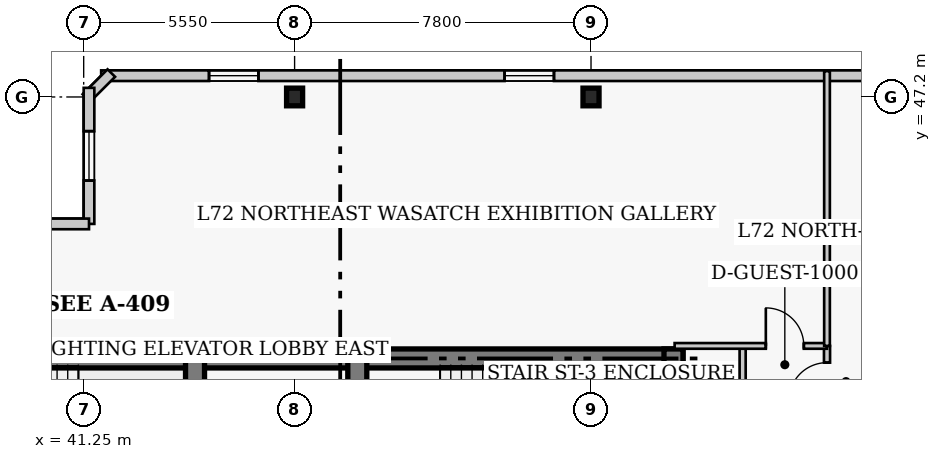
"""IFC4 building model, lengths in metres.
Left out: names, types, materials, properties, quantities, classifications, styles, units other than length and angle.
Written with IfcOpenShell. Run it as: python <this file> out.ifc"""

import sys

from ifc_helpers import new_model, si_unit, direction, frame, frame_2d, origin, origin_2d, place, context, subcontext, project, spatial, rectangle, i_section, extrude, element, fill, save


model = new_model("IFC4")
c1 = context("Model", 3, precision=1e-05, world=origin(), true_north=direction((0.0, 1.0)))
c2 = subcontext(c1, "Body", "Model", "MODEL_VIEW")
j1 = project(units=[si_unit("LENGTHUNIT", "METRE"), si_unit("PLANEANGLEUNIT", "RADIAN")], contexts=[c1])
p1 = place(None, origin())
s1 = spatial("IfcSite", under=j1, at=p1, CompositionType="ELEMENT")
p2 = place(p1, origin())
s2 = spatial("IfcBuilding", under=s1, at=p2, CompositionType="ELEMENT")
p3 = place(p2, frame((0.0, 0.0, 289.4)))
s3 = spatial("IfcBuildingStorey", under=s2, at=p3, CompositionType="ELEMENT", Elevation=289.4)
p4 = place(p3, frame((35.85, 40.32, 0.0), z_axis=(0.0, 0.0, 1.0), x_axis=(1.0, 0.0, 0.0)))
e1 = element("IfcWall", 1, at=p4, inside=s3, PredefinedType="SHEAR", context=c2, shape_type="SweptSolid", body=[
    extrude(rectangle(XDim=12.6, YDim=0.5, at=frame_2d((6.3, 0.0))), origin(), (0.0, 0.0, 1.0), 4.0),
])
p5 = place(p3, frame((48.45, 40.32, 0.0), z_axis=(0.0, 0.0, 1.0), x_axis=(1.0, 0.0, 0.0)))
e2 = element("IfcWall", 2, at=p5, inside=s3, PredefinedType="SHEAR", context=c2, shape_type="SweptSolid", body=[
    extrude(rectangle(XDim=8.57, YDim=0.5, at=frame_2d((4.285, 0.0))), origin(), (0.0, 0.0, 1.0), 4.0),
])
p6 = place(p3, frame((56.77, 27.05, 0.0), z_axis=(0.0, 0.0, 1.0), x_axis=(0.0, 1.0, 0.0)))
e3 = element("IfcWall", 3, at=p6, inside=s3, PredefinedType="SHEAR", context=c2, shape_type="SweptSolid", body=[
    extrude(rectangle(XDim=13.52, YDim=0.5, at=frame_2d((6.76, 0.0))), origin(), (0.0, 0.0, 1.0), 4.0),
])
p7 = place(p3, frame((44.18, 36.37, 0.0), z_axis=(0.0, 0.0, 1.0), x_axis=(0.0, 1.0, 0.0)))
e4 = element("IfcWall", 4, at=p7, inside=s3, PredefinedType="SHEAR", context=c2, shape_type="SweptSolid", body=[
    extrude(rectangle(XDim=3.95, YDim=0.5, at=frame_2d((1.975, 0.0))), origin(), (0.0, 0.0, 1.0), 4.0),
])
p8 = place(p3, frame((48.45, 32.5, 0.0), z_axis=(0.0, 0.0, 1.0), x_axis=(0.0, 1.0, 0.0)))
e5 = element("IfcWall", 5, at=p8, inside=s3, PredefinedType="SHEAR", context=c2, shape_type="SweptSolid", body=[
    extrude(rectangle(XDim=7.82, YDim=0.5, at=frame_2d((3.91, 0.0))), origin(), (0.0, 0.0, 1.0), 4.0),
])
p9 = place(p8, frame((5.7, 0.0, 0.0)))
e6 = element("IfcOpeningElement", 6, at=p9, cuts=e5, PredefinedType="OPENING", context=c2, shape_type="SweptSolid", body=[
    extrude(rectangle(XDim=1.1, YDim=2.15, at=frame_2d((0.55, 1.075))), frame((0.0, 0.26, 0.0), z_axis=(0.0, -1.0, 0.0), x_axis=(1.0, 0.0, 0.0)), (0.0, 0.0, 1.0), 0.52),
])
for number, where, z_axis, x_axis in (
    (7, (46.8, 47.2, 0.0), (0.0, 0.0, 1.0), (1.0, 0.0, 0.0)),
    (8, (54.6, 47.2, 0.0), (0.0, 0.0, 1.0), (1.0, 0.0, 0.0)),
):
    element("IfcColumn", number, at=place(p3, frame(where, z_axis=z_axis, x_axis=x_axis)), inside=s3, PredefinedType="COLUMN", context=c2, shape_type="SweptSolid", body=[
        extrude(i_section(OverallWidth=0.422, OverallDepth=0.465, WebThickness=0.045, FlangeThickness=0.073, FilletRadius=0.017, at=origin_2d()), origin(), (0.0, 0.0, 1.0), 4.0),
    ])
p10 = place(p3, frame((66.54, 47.76, 0.0), z_axis=(0.0, 0.0, 1.0), x_axis=(-1.0, 0.0, 0.0)))
e9 = element("IfcWall", 9, at=p10, inside=s3, PredefinedType="SOLIDWALL", context=c2, shape_type="SweptSolid", body=[
    extrude(rectangle(XDim=24.83, YDim=0.28, at=frame_2d((12.415, 0.0))), origin(), (0.0, 0.0, 1.0), 3.76),
])
p11 = place(p10, frame((3.488, 0.0, 0.85)))
e10 = element("IfcOpeningElement", 10, at=p11, cuts=e9, PredefinedType="OPENING", context=c2, shape_type="SweptSolid", body=[
    extrude(rectangle(XDim=1.3, YDim=1.7, at=frame_2d((0.65, 0.85))), frame((0.0, 0.15, 0.0), z_axis=(0.0, -1.0, 0.0), x_axis=(1.0, 0.0, 0.0)), (0.0, 0.0, 1.0), 0.3),
])
p12 = place(p10, frame((12.915, 0.0, 0.85)))
e11 = element("IfcOpeningElement", 11, at=p12, cuts=e9, PredefinedType="OPENING", context=c2, shape_type="SweptSolid", body=[
    extrude(rectangle(XDim=1.3, YDim=1.7, at=frame_2d((0.65, 0.85))), frame((0.0, 0.15, 0.0), z_axis=(0.0, -1.0, 0.0), x_axis=(1.0, 0.0, 0.0)), (0.0, 0.0, 1.0), 0.3),
])
p13 = place(p10, frame((20.692, 0.0, 0.85)))
e12 = element("IfcOpeningElement", 12, at=p13, cuts=e9, PredefinedType="OPENING", context=c2, shape_type="SweptSolid", body=[
    extrude(rectangle(XDim=1.3, YDim=1.7, at=frame_2d((0.65, 0.85))), frame((0.0, 0.15, 0.0), z_axis=(0.0, -1.0, 0.0), x_axis=(1.0, 0.0, 0.0)), (0.0, 0.0, 1.0), 0.3),
])
p14 = place(p3, frame((41.977, 47.829, 0.0), z_axis=(0.0, 0.0, 1.0), x_axis=(-0.706975312048, -0.707238225886, 0.0)))
e13 = element("IfcWall", 13, at=p14, inside=s3, PredefinedType="SOLIDWALL", context=c2, shape_type="SweptSolid", body=[
    extrude(rectangle(XDim=0.929, YDim=0.28, at=frame_2d((0.464, 0.0))), origin(), (0.0, 0.0, 1.0), 3.76),
])
p15 = place(p3, frame((41.39, 47.44, 0.0), z_axis=(0.0, 0.0, 1.0), x_axis=(0.0, -1.0, 0.0)))
e14 = element("IfcWall", 14, at=p15, inside=s3, PredefinedType="SOLIDWALL", context=c2, shape_type="SweptSolid", body=[
    extrude(rectangle(XDim=3.58, YDim=0.28, at=frame_2d((1.79, 0.0))), origin(), (0.0, 0.0, 1.0), 3.76),
])
p16 = place(p15, frame((1.14, 0.0, 0.85)))
e15 = element("IfcOpeningElement", 15, at=p16, cuts=e14, PredefinedType="OPENING", context=c2, shape_type="SweptSolid", body=[
    extrude(rectangle(XDim=1.3, YDim=1.7, at=frame_2d((0.65, 0.85))), frame((0.0, 0.15, 0.0), z_axis=(0.0, -1.0, 0.0), x_axis=(1.0, 0.0, 0.0)), (0.0, 0.0, 1.0), 0.3),
])
p17 = place(p3, frame((41.39, 43.86, 0.0), z_axis=(0.0, 0.0, 1.0), x_axis=(-1.0, 0.0, 0.0)))
e16 = element("IfcWall", 16, at=p17, inside=s3, PredefinedType="SOLIDWALL", context=c2, shape_type="SweptSolid", body=[
    extrude(rectangle(XDim=4.78, YDim=0.28, at=frame_2d((2.39, 0.0))), origin(), (0.0, 0.0, 1.0), 3.76),
])
p18 = place(p17, frame((1.74, 0.0, 0.85)))
e17 = element("IfcOpeningElement", 17, at=p18, cuts=e16, PredefinedType="OPENING", context=c2, shape_type="SweptSolid", body=[
    extrude(rectangle(XDim=1.3, YDim=1.7, at=frame_2d((0.65, 0.85))), frame((0.0, 0.15, 0.0), z_axis=(0.0, -1.0, 0.0), x_axis=(1.0, 0.0, 0.0)), (0.0, 0.0, 1.0), 0.3),
])
p19 = place(p3, frame((60.81, 22.5, 0.0), z_axis=(0.0, 0.0, 1.0), x_axis=(0.0, 1.0, 0.0)))
e18 = element("IfcWall", 18, at=p19, inside=s3, PredefinedType="PARTITIONING", context=c2, shape_type="SweptSolid", body=[
    extrude(rectangle(XDim=18.15, YDim=0.16, at=frame_2d((9.075, 0.0))), origin(), (0.0, 0.0, 1.0), 3.76),
])
p20 = place(p19, frame((2.675, 0.0, 0.0)))
e19 = element("IfcOpeningElement", 19, at=p20, cuts=e18, PredefinedType="OPENING", context=c2, shape_type="SweptSolid", body=[
    extrude(rectangle(XDim=0.95, YDim=2.1, at=frame_2d((0.475, 1.05))), frame((0.0, 0.09, 0.0), z_axis=(0.0, -1.0, 0.0), x_axis=(1.0, 0.0, 0.0)), (0.0, 0.0, 1.0), 0.18),
])
p21 = place(p19, frame((9.875, 0.0, 0.0)))
e20 = element("IfcOpeningElement", 20, at=p21, cuts=e18, PredefinedType="OPENING", context=c2, shape_type="SweptSolid", body=[
    extrude(rectangle(XDim=0.95, YDim=2.1, at=frame_2d((0.475, 1.05))), frame((0.0, 0.09, 0.0), z_axis=(0.0, -1.0, 0.0), x_axis=(1.0, 0.0, 0.0)), (0.0, 0.0, 1.0), 0.18),
])
p22 = place(p19, frame((16.71, 0.0, 0.0)))
e21 = element("IfcOpeningElement", 21, at=p22, cuts=e18, PredefinedType="OPENING", context=c2, shape_type="SweptSolid", body=[
    extrude(rectangle(XDim=1.0, YDim=2.15, at=frame_2d((0.5, 1.075))), frame((0.0, 0.09, 0.0), z_axis=(0.0, -1.0, 0.0), x_axis=(1.0, 0.0, 0.0)), (0.0, 0.0, 1.0), 0.18),
])
p23 = place(p3, frame((58.59, 24.66, 0.0), z_axis=(0.0, 0.0, 1.0), x_axis=(0.0, 1.0, 0.0)))
e22 = element("IfcWall", 22, at=p23, inside=s3, PredefinedType="PARTITIONING", context=c2, shape_type="SweptSolid", body=[
    extrude(rectangle(XDim=15.99, YDim=0.16, at=frame_2d((7.995, 0.0))), origin(), (0.0, 0.0, 1.0), 3.76),
])
p24 = place(p3, frame((56.8, 40.65, 0.0), z_axis=(0.0, 0.0, 1.0), x_axis=(1.0, 0.0, 0.0)))
e23 = element("IfcWall", 23, at=p24, inside=s3, PredefinedType="PARTITIONING", context=c2, shape_type="SweptSolid", body=[
    extrude(rectangle(XDim=4.01, YDim=0.15, at=frame_2d((2.005, 0.0))), origin(), (0.0, 0.0, 1.0), 3.76),
])
p25 = place(p24, frame((2.4, 0.0, 0.0)))
e24 = element("IfcOpeningElement", 24, at=p25, cuts=e23, PredefinedType="OPENING", context=c2, shape_type="SweptSolid", body=[
    extrude(rectangle(XDim=1.0, YDim=2.15, at=frame_2d((0.5, 1.075))), frame((0.0, 0.085, 0.0), z_axis=(0.0, -1.0, 0.0), x_axis=(1.0, 0.0, 0.0)), (0.0, 0.0, 1.0), 0.17),
])
p26 = place(p3, frame((60.81, 40.65, 0.0), z_axis=(0.0, 0.0, 1.0), x_axis=(0.0, 1.0, 0.0)))
e25 = element("IfcWall", 25, at=p26, inside=s3, PredefinedType="PARTITIONING", context=c2, shape_type="SweptSolid", body=[
    extrude(rectangle(XDim=7.23, YDim=0.15, at=frame_2d((3.615, 0.0))), origin(), (0.0, 0.0, 1.0), 3.76),
])
p27 = place(p12, origin())
e26 = element("IfcWindow", 26, at=p27, inside=s3, PartitioningType="SINGLE_PANEL", PredefinedType="WINDOW", context=c2, shape_type="SweptSolid", body=[
    extrude(rectangle(XDim=1.3, YDim=1.7, at=frame_2d((0.65, 0.85))), frame((0.0, 0.03, 0.0), z_axis=(0.0, -1.0, 0.0), x_axis=(1.0, 0.0, 0.0)), (0.0, 0.0, 1.0), 0.06),
])
fill(e11, e26)
p28 = place(p13, origin())
e27 = element("IfcWindow", 27, at=p28, inside=s3, PartitioningType="SINGLE_PANEL", PredefinedType="WINDOW", context=c2, shape_type="SweptSolid", body=[
    extrude(rectangle(XDim=1.3, YDim=1.7, at=frame_2d((0.65, 0.85))), frame((0.0, 0.03, 0.0), z_axis=(0.0, -1.0, 0.0), x_axis=(1.0, 0.0, 0.0)), (0.0, 0.0, 1.0), 0.06),
])
fill(e12, e27)
p29 = place(p16, origin())
e28 = element("IfcWindow", 28, at=p29, inside=s3, PartitioningType="SINGLE_PANEL", PredefinedType="WINDOW", context=c2, shape_type="SweptSolid", body=[
    extrude(rectangle(XDim=1.3, YDim=1.7, at=frame_2d((0.65, 0.85))), frame((0.0, 0.03, 0.0), z_axis=(0.0, -1.0, 0.0), x_axis=(1.0, 0.0, 0.0)), (0.0, 0.0, 1.0), 0.06),
])
fill(e15, e28)
p30 = place(p25, origin())
e29 = element("IfcDoor", 29, at=p30, inside=s3, OperationType="SINGLE_SWING_LEFT", PredefinedType="DOOR", context=c2, shape_type="SweptSolid", body=[
    extrude(rectangle(XDim=1.0, YDim=2.15, at=frame_2d((0.5, 1.075))), frame((0.0, 0.025, 0.0), z_axis=(0.0, -1.0, 0.0), x_axis=(1.0, 0.0, 0.0)), (0.0, 0.0, 1.0), 0.05),
])
fill(e24, e29)
p31 = place(p22, origin())
e30 = element("IfcDoor", 30, at=p31, inside=s3, OperationType="SINGLE_SWING_LEFT", PredefinedType="DOOR", context=c2, shape_type="SweptSolid", body=[
    extrude(rectangle(XDim=1.0, YDim=2.15, at=frame_2d((0.5, 1.075))), frame((0.0, 0.025, 0.0), z_axis=(0.0, -1.0, 0.0), x_axis=(1.0, 0.0, 0.0)), (0.0, 0.0, 1.0), 0.05),
])
fill(e21, e30)
save(model, sys.argv[1])
